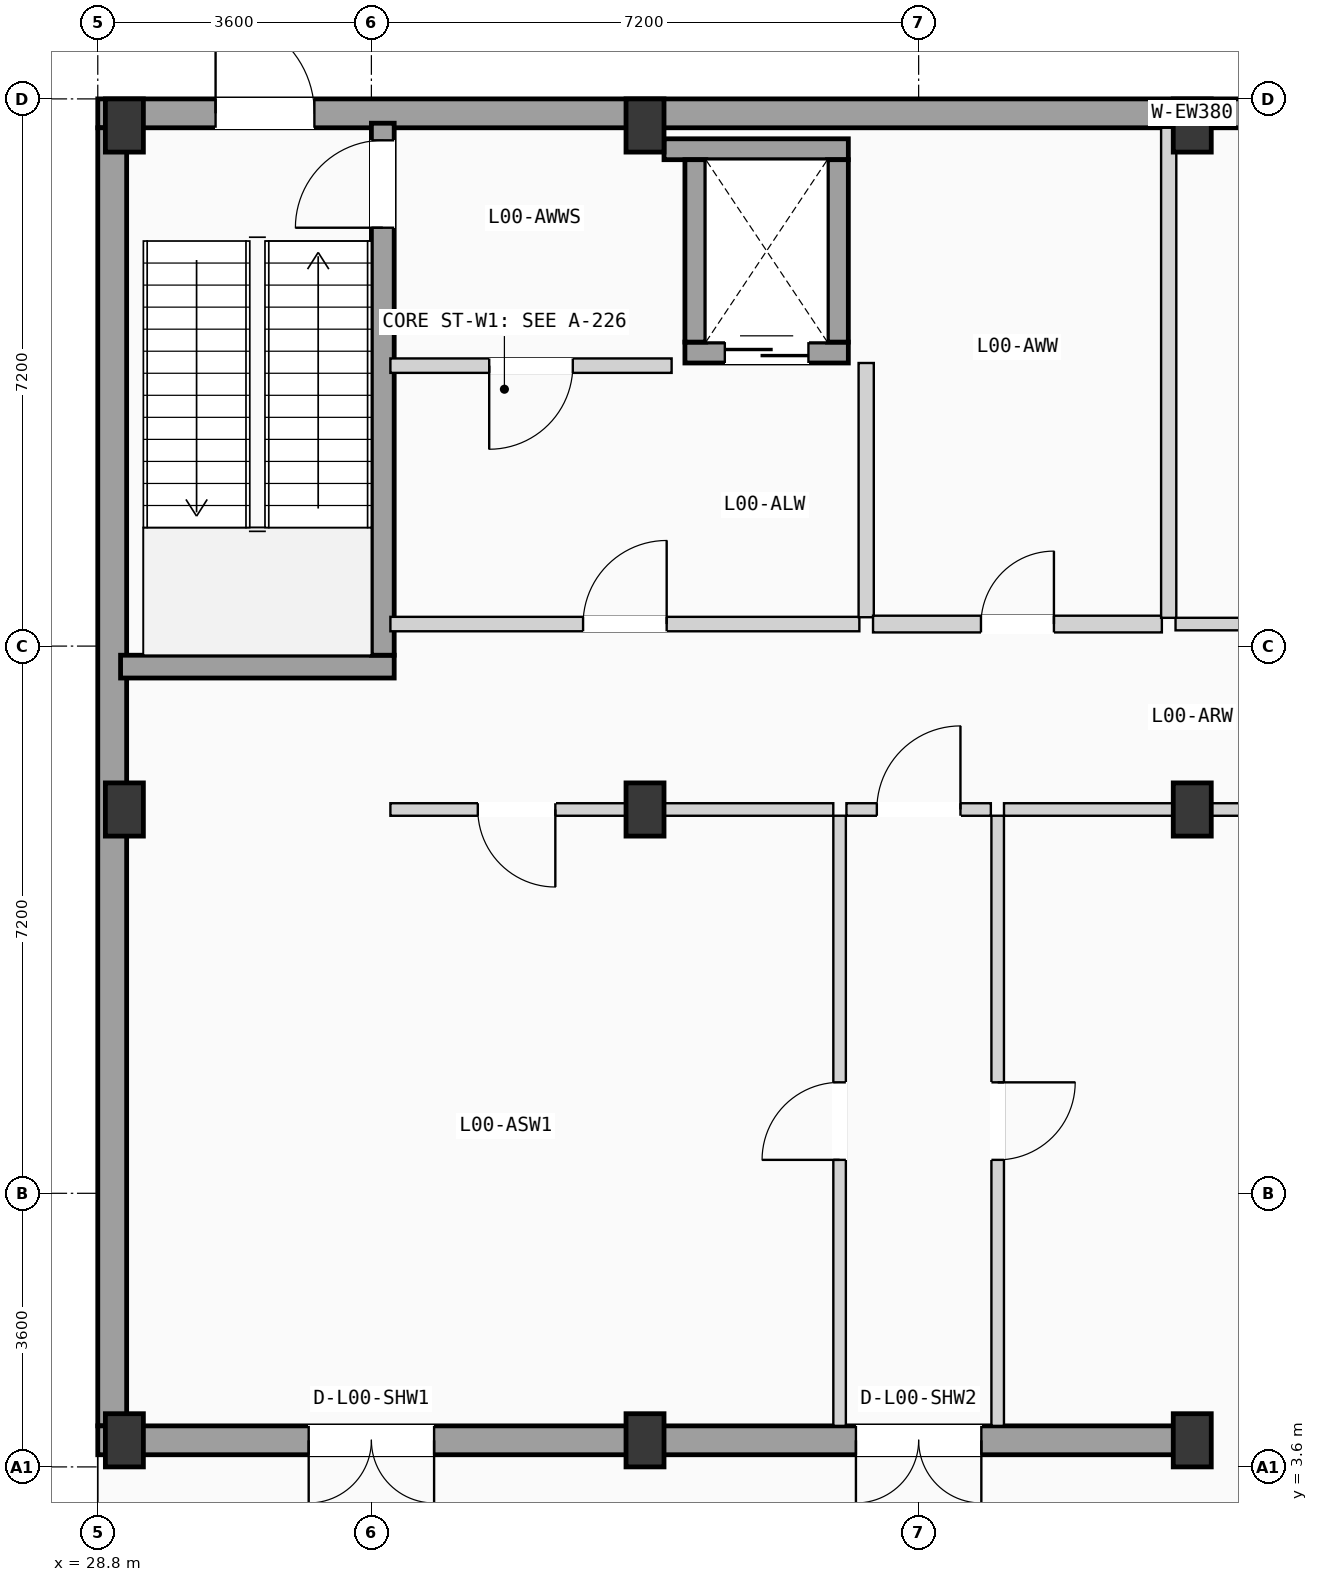
"""IFC4 building model, lengths in metres.
Left out: names, types, materials, properties, quantities, classifications, styles, units other than length and angle.
Written with IfcOpenShell. Run it as: python <this file> out.ifc"""

import sys

from ifc_helpers import new_model, si_unit, direction, frame, frame_2d, origin, origin_2d, place, context, subcontext, project, spatial, rectangle, extrude, element, fill, save


model = new_model("IFC4")
c1 = context("Model", 3, precision=1e-05, world=origin(), true_north=direction((0.0, 1.0)))
c2 = subcontext(c1, "Body", "Model", "MODEL_VIEW")
j1 = project(units=[si_unit("LENGTHUNIT", "METRE"), si_unit("PLANEANGLEUNIT", "RADIAN")], contexts=[c1])
p1 = place(None, origin())
s1 = spatial("IfcSite", under=j1, at=p1, CompositionType="ELEMENT")
p2 = place(p1, origin())
s2 = spatial("IfcBuilding", under=s1, at=p2, CompositionType="ELEMENT")
p3 = place(p2, origin())
s3 = spatial("IfcBuildingStorey", under=s2, at=p3, CompositionType="ELEMENT", Elevation=0.0)
for number, where, z_axis, x_axis in (
    (1, (29.15, 3.95, 0.0), (0.0, 0.0, 1.0), (1.0, 0.0, 0.0)),
    (2, (29.15, 12.25, 0.0), (0.0, 0.0, 1.0), (1.0, 0.0, 0.0)),
    (3, (29.15, 21.25, 0.0), (0.0, 0.0, 1.0), (1.0, 0.0, 0.0)),
    (4, (36.0, 3.95, 0.0), (0.0, 0.0, 1.0), (1.0, 0.0, 0.0)),
    (5, (36.0, 12.25, 0.0), (0.0, 0.0, 1.0), (1.0, 0.0, 0.0)),
    (6, (36.0, 21.25, 0.0), (0.0, 0.0, 1.0), (1.0, 0.0, 0.0)),
    (7, (43.2, 3.95, 0.0), (0.0, 0.0, 1.0), (1.0, 0.0, 0.0)),
    (8, (43.2, 12.25, 0.0), (0.0, 0.0, 1.0), (1.0, 0.0, 0.0)),
    (9, (43.2, 21.25, 0.0), (0.0, 0.0, 1.0), (1.0, 0.0, 0.0)),
):
    element("IfcColumn", number, at=place(p3, frame(where, z_axis=z_axis, x_axis=x_axis)), inside=s3, PredefinedType="COLUMN", context=c2, shape_type="SweptSolid", body=[
        extrude(rectangle(XDim=0.5, YDim=0.7, at=origin_2d()), origin(), (0.0, 0.0, 1.0), 4.9),
    ])
p4 = place(p3, frame((28.8, 21.41, 0.0), z_axis=(0.0, 0.0, 1.0), x_axis=(1.0, 0.0, 0.0)))
e10 = element("IfcWall", 10, at=p4, inside=s3, PredefinedType="SOLIDWALL", context=c2, shape_type="SweptSolid", body=[
    extrude(rectangle(XDim=28.8, YDim=0.38, at=frame_2d((14.4, 0.0))), origin(), (0.0, 0.0, 1.0), 4.625),
])
p5 = place(p4, frame((1.55, 0.0, 0.0)))
e11 = element("IfcOpeningElement", 11, at=p5, cuts=e10, PredefinedType="OPENING", context=c2, shape_type="SweptSolid", body=[
    extrude(rectangle(XDim=1.3, YDim=2.2, at=frame_2d((0.65, 1.1))), frame((0.0, 0.2, 0.0), z_axis=(0.0, -1.0, 0.0), x_axis=(1.0, 0.0, 0.0)), (0.0, 0.0, 1.0), 0.4),
])
p6 = place(p4, frame((25.95, 0.0, 0.0)))
e12 = element("IfcOpeningElement", 12, at=p6, cuts=e10, PredefinedType="OPENING", context=c2, shape_type="SweptSolid", body=[
    extrude(rectangle(XDim=1.3, YDim=2.2, at=frame_2d((0.65, 1.1))), frame((0.0, 0.2, 0.0), z_axis=(0.0, -1.0, 0.0), x_axis=(1.0, 0.0, 0.0)), (0.0, 0.0, 1.0), 0.4),
])
p7 = place(p3, frame((28.99, 4.14, 0.0), z_axis=(0.0, 0.0, 1.0), x_axis=(0.0, 1.0, 0.0)))
e13 = element("IfcWall", 13, at=p7, inside=s3, PredefinedType="SOLIDWALL", context=c2, shape_type="SweptSolid", body=[
    extrude(rectangle(XDim=17.08, YDim=0.38, at=frame_2d((8.54, 0.0))), origin(), (0.0, 0.0, 1.0), 4.625),
])
p8 = place(p3, frame((28.8, 3.95, 0.0), z_axis=(0.0, 0.0, 1.0), x_axis=(1.0, 0.0, 0.0)))
e14 = element("IfcWall", 14, at=p8, inside=s3, PredefinedType="SOLIDWALL", context=c2, shape_type="SweptSolid", body=[
    extrude(rectangle(XDim=7.2, YDim=0.38, at=frame_2d((3.6, 0.0))), origin(), (0.0, 0.0, 1.0), 4.625),
])
p9 = place(p8, frame((2.775, 0.0, 0.0)))
e15 = element("IfcOpeningElement", 15, at=p9, cuts=e14, PredefinedType="OPENING", context=c2, shape_type="SweptSolid", body=[
    extrude(rectangle(XDim=1.65, YDim=2.3, at=frame_2d((0.825, 1.15))), frame((0.0, 0.2, 0.0), z_axis=(0.0, -1.0, 0.0), x_axis=(1.0, 0.0, 0.0)), (0.0, 0.0, 1.0), 0.4),
])
p10 = place(p3, frame((36.0, 3.95, 0.0), z_axis=(0.0, 0.0, 1.0), x_axis=(1.0, 0.0, 0.0)))
e16 = element("IfcWall", 16, at=p10, inside=s3, PredefinedType="SOLIDWALL", context=c2, shape_type="SweptSolid", body=[
    extrude(rectangle(XDim=7.2, YDim=0.38, at=frame_2d((3.6, 0.0))), origin(), (0.0, 0.0, 1.0), 4.625),
])
p11 = place(p10, frame((2.775, 0.0, 0.0)))
e17 = element("IfcOpeningElement", 17, at=p11, cuts=e16, PredefinedType="OPENING", context=c2, shape_type="SweptSolid", body=[
    extrude(rectangle(XDim=1.65, YDim=2.3, at=frame_2d((0.825, 1.15))), frame((0.0, 0.2, 0.0), z_axis=(0.0, -1.0, 0.0), x_axis=(1.0, 0.0, 0.0)), (0.0, 0.0, 1.0), 0.4),
])
p12 = place(p3, frame((29.1, 14.13, 0.0), z_axis=(0.0, 0.0, 1.0), x_axis=(1.0, 0.0, 0.0)))
e18 = element("IfcWall", 18, at=p12, inside=s3, PredefinedType="SHEAR", context=c2, shape_type="SweptSolid", body=[
    extrude(rectangle(XDim=3.6, YDim=0.3, at=frame_2d((1.8, 0.0))), origin(), (0.0, 0.0, 1.0), 4.625),
])
p13 = place(p3, frame((32.55, 14.28, 0.0), z_axis=(0.0, 0.0, 1.0), x_axis=(0.0, 1.0, 0.0)))
e19 = element("IfcWall", 19, at=p13, inside=s3, PredefinedType="SHEAR", context=c2, shape_type="SweptSolid", body=[
    extrude(rectangle(XDim=7.0, YDim=0.3, at=frame_2d((3.5, 0.0))), origin(), (0.0, 0.0, 1.0), 4.625),
])
p14 = place(p13, frame((5.625, 0.0, 0.0)))
e20 = element("IfcOpeningElement", 20, at=p14, cuts=e19, PredefinedType="OPENING", context=c2, shape_type="SweptSolid", body=[
    extrude(rectangle(XDim=1.15, YDim=2.12, at=frame_2d((0.575, 1.06))), frame((0.0, 0.16, 0.0), z_axis=(0.0, -1.0, 0.0), x_axis=(1.0, 0.0, 0.0)), (0.0, 0.0, 1.0), 0.32),
])
p15 = place(p3, frame((36.525, 18.262, 0.0), z_axis=(0.0, 0.0, 1.0), x_axis=(1.0, 0.0, 0.0)))
e21 = element("IfcWall", 21, at=p15, inside=s3, PredefinedType="SHEAR", context=c2, shape_type="SweptSolid", body=[
    extrude(rectangle(XDim=2.15, YDim=0.275, at=frame_2d((1.075, 0.0))), origin(), (0.0, 0.0, 1.0), 4.625),
])
p16 = place(p15, frame((0.525, 0.0, 0.0)))
e22 = element("IfcOpeningElement", 22, at=p16, cuts=e21, PredefinedType="OPENING", context=c2, shape_type="SweptSolid", body=[
    extrude(rectangle(XDim=1.1, YDim=2.15, at=frame_2d((0.55, 1.075))), frame((0.0, 0.147, 0.0), z_axis=(0.0, -1.0, 0.0), x_axis=(1.0, 0.0, 0.0)), (0.0, 0.0, 1.0), 0.295),
])
p17 = place(p3, frame((36.25, 20.938, 0.0), z_axis=(0.0, 0.0, 1.0), x_axis=(1.0, 0.0, 0.0)))
e23 = element("IfcWall", 23, at=p17, inside=s3, PredefinedType="SHEAR", context=c2, shape_type="SweptSolid", body=[
    extrude(rectangle(XDim=2.425, YDim=0.275, at=frame_2d((1.212, 0.0))), origin(), (0.0, 0.0, 1.0), 4.625),
])
for number, where, z_axis, x_axis in (
    (24, (36.663, 18.4, 0.0), (0.0, 0.0, 1.0), (0.0, 1.0, 0.0)),
    (25, (38.538, 18.4, 0.0), (0.0, 0.0, 1.0), (0.0, 1.0, 0.0)),
):
    element("IfcWall", number, at=place(p3, frame(where, z_axis=z_axis, x_axis=x_axis)), inside=s3, PredefinedType="SHEAR", context=c2, shape_type="SweptSolid", body=[
        extrude(rectangle(XDim=2.4, YDim=0.275, at=frame_2d((1.2, 0.0))), origin(), (0.0, 0.0, 1.0), 4.625),
    ])
p18 = place(p3, frame((38.65, 12.25, 0.0), z_axis=(0.0, 0.0, 1.0), x_axis=(1.0, 0.0, 0.0)))
e26 = element("IfcWall", 26, at=p18, inside=s3, PredefinedType="PARTITIONING", context=c2, shape_type="SweptSolid", body=[
    extrude(rectangle(XDim=1.9, YDim=0.165, at=frame_2d((0.95, 0.0))), origin(), (0.0, 0.0, 1.0), 3.84),
])
p19 = place(p18, frame((0.4, 0.0, 0.0)))
e27 = element("IfcOpeningElement", 27, at=p19, cuts=e26, PredefinedType="OPENING", context=c2, shape_type="SweptSolid", body=[
    extrude(rectangle(XDim=1.1, YDim=2.12, at=frame_2d((0.55, 1.06))), frame((0.0, 0.093, 0.0), z_axis=(0.0, -1.0, 0.0), x_axis=(1.0, 0.0, 0.0)), (0.0, 0.0, 1.0), 0.185),
])
p20 = place(p3, frame((38.56, 4.14, 0.0), z_axis=(0.0, 0.0, 1.0), x_axis=(0.0, 1.0, 0.0)))
e28 = element("IfcWall", 28, at=p20, inside=s3, PredefinedType="PARTITIONING", context=c2, shape_type="SweptSolid", body=[
    extrude(rectangle(XDim=8.028, YDim=0.165, at=frame_2d((4.014, 0.0))), origin(), (0.0, 0.0, 1.0), 3.84),
])
p21 = place(p20, frame((3.5, 0.0, 0.0)))
e29 = element("IfcOpeningElement", 29, at=p21, cuts=e28, PredefinedType="OPENING", context=c2, shape_type="SweptSolid", body=[
    extrude(rectangle(XDim=1.02, YDim=2.16, at=frame_2d((0.51, 1.08))), frame((0.0, 0.093, 0.0), z_axis=(0.0, -1.0, 0.0), x_axis=(1.0, 0.0, 0.0)), (0.0, 0.0, 1.0), 0.185),
])
p22 = place(p3, frame((40.64, 4.14, 0.0), z_axis=(0.0, 0.0, 1.0), x_axis=(0.0, 1.0, 0.0)))
e30 = element("IfcWall", 30, at=p22, inside=s3, PredefinedType="PARTITIONING", context=c2, shape_type="SweptSolid", body=[
    extrude(rectangle(XDim=8.028, YDim=0.165, at=frame_2d((4.014, 0.0))), origin(), (0.0, 0.0, 1.0), 3.84),
])
p23 = place(p22, frame((3.5, 0.0, 0.0)))
e31 = element("IfcOpeningElement", 31, at=p23, cuts=e30, PredefinedType="OPENING", context=c2, shape_type="SweptSolid", body=[
    extrude(rectangle(XDim=1.02, YDim=2.16, at=frame_2d((0.51, 1.08))), frame((0.0, 0.093, 0.0), z_axis=(0.0, -1.0, 0.0), x_axis=(1.0, 0.0, 0.0)), (0.0, 0.0, 1.0), 0.185),
])
p24 = place(p3, frame((32.65, 18.09, 0.0), z_axis=(0.0, 0.0, 1.0), x_axis=(1.0, 0.0, 0.0)))
e32 = element("IfcWall", 32, at=p24, inside=s3, PredefinedType="PARTITIONING", context=c2, shape_type="SweptSolid", body=[
    extrude(rectangle(XDim=3.7, YDim=0.19, at=frame_2d((1.85, 0.0))), origin(), (0.0, 0.0, 1.0), 3.84),
])
p25 = place(p24, frame((1.3, 0.0, 0.0)))
e33 = element("IfcOpeningElement", 33, at=p25, cuts=e32, PredefinedType="OPENING", context=c2, shape_type="SweptSolid", body=[
    extrude(rectangle(XDim=1.1, YDim=2.12, at=frame_2d((0.55, 1.06))), frame((0.0, 0.105, 0.0), z_axis=(0.0, -1.0, 0.0), x_axis=(1.0, 0.0, 0.0)), (0.0, 0.0, 1.0), 0.21),
])
p26 = place(p3, frame((32.65, 14.69, 0.0), z_axis=(0.0, 0.0, 1.0), x_axis=(1.0, 0.0, 0.0)))
e34 = element("IfcWall", 34, at=p26, inside=s3, PredefinedType="PARTITIONING", context=c2, shape_type="SweptSolid", body=[
    extrude(rectangle(XDim=6.17, YDim=0.19, at=frame_2d((3.085, 0.0))), origin(), (0.0, 0.0, 1.0), 3.84),
])
p27 = place(p26, frame((2.535, 0.0, 0.0)))
e35 = element("IfcOpeningElement", 35, at=p27, cuts=e34, PredefinedType="OPENING", context=c2, shape_type="SweptSolid", body=[
    extrude(rectangle(XDim=1.1, YDim=2.12, at=frame_2d((0.55, 1.06))), frame((0.0, 0.105, 0.0), z_axis=(0.0, -1.0, 0.0), x_axis=(1.0, 0.0, 0.0)), (0.0, 0.0, 1.0), 0.21),
])
p28 = place(p3, frame((38.91, 14.78, 0.0), z_axis=(0.0, 0.0, 1.0), x_axis=(0.0, 1.0, 0.0)))
e36 = element("IfcWall", 36, at=p28, inside=s3, PredefinedType="PLUMBINGWALL", context=c2, shape_type="SweptSolid", body=[
    extrude(rectangle(XDim=3.345, YDim=0.2, at=frame_2d((1.672, 0.0))), origin(), (0.0, 0.0, 1.0), 3.84),
])
p29 = place(p3, frame((32.65, 12.25, 0.0), z_axis=(0.0, 0.0, 1.0), x_axis=(1.0, 0.0, 0.0)))
e37 = element("IfcWall", 37, at=p29, inside=s3, PredefinedType="PARTITIONING", context=c2, shape_type="SweptSolid", body=[
    extrude(rectangle(XDim=5.827, YDim=0.165, at=frame_2d((2.914, 0.0))), origin(), (0.0, 0.0, 1.0), 3.84),
])
p30 = place(p29, frame((1.15, 0.0, 0.0)))
e38 = element("IfcOpeningElement", 38, at=p30, cuts=e37, PredefinedType="OPENING", context=c2, shape_type="SweptSolid", body=[
    extrude(rectangle(XDim=1.02, YDim=2.16, at=frame_2d((0.51, 1.08))), frame((0.0, 0.093, 0.0), z_axis=(0.0, -1.0, 0.0), x_axis=(1.0, 0.0, 0.0)), (0.0, 0.0, 1.0), 0.185),
])
p31 = place(p3, frame((40.723, 12.25, 0.0), z_axis=(0.0, 0.0, 1.0), x_axis=(1.0, 0.0, 0.0)))
e39 = element("IfcWall", 39, at=p31, inside=s3, PredefinedType="PARTITIONING", context=c2, shape_type="SweptSolid", body=[
    extrude(rectangle(XDim=13.027, YDim=0.165, at=frame_2d((6.514, 0.0))), origin(), (0.0, 0.0, 1.0), 3.84),
])
p32 = place(p31, frame((6.007, 0.0, 0.0)))
e40 = element("IfcOpeningElement", 40, at=p32, cuts=e39, PredefinedType="OPENING", context=c2, shape_type="SweptSolid", body=[
    extrude(rectangle(XDim=1.02, YDim=2.16, at=frame_2d((0.51, 1.08))), frame((0.0, 0.093, 0.0), z_axis=(0.0, -1.0, 0.0), x_axis=(1.0, 0.0, 0.0)), (0.0, 0.0, 1.0), 0.185),
])
p33 = place(p3, frame((39.0, 14.69, 0.0), z_axis=(0.0, 0.0, 1.0), x_axis=(1.0, 0.0, 0.0)))
e41 = element("IfcWall", 41, at=p33, inside=s3, PredefinedType="PLUMBINGWALL", context=c2, shape_type="SweptSolid", body=[
    extrude(rectangle(XDim=3.8, YDim=0.22, at=frame_2d((1.9, 0.0))), origin(), (0.0, 0.0, 1.0), 3.84),
])
p34 = place(p33, frame((1.42, 0.0, 0.0)))
e42 = element("IfcOpeningElement", 42, at=p34, cuts=e41, PredefinedType="OPENING", context=c2, shape_type="SweptSolid", body=[
    extrude(rectangle(XDim=0.96, YDim=2.05, at=frame_2d((0.48, 1.025))), frame((0.0, 0.12, 0.0), z_axis=(0.0, -1.0, 0.0), x_axis=(1.0, 0.0, 0.0)), (0.0, 0.0, 1.0), 0.24),
])
p35 = place(p3, frame((42.98, 14.69, 0.0), z_axis=(0.0, 0.0, 1.0), x_axis=(1.0, 0.0, 0.0)))
e43 = element("IfcWall", 43, at=p35, inside=s3, PredefinedType="PARTITIONING", context=c2, shape_type="SweptSolid", body=[
    extrude(rectangle(XDim=8.54, YDim=0.165, at=frame_2d((4.27, 0.0))), origin(), (0.0, 0.0, 1.0), 3.84),
])
p36 = place(p35, frame((3.76, 0.0, 0.0)))
e44 = element("IfcOpeningElement", 44, at=p36, cuts=e43, PredefinedType="OPENING", context=c2, shape_type="SweptSolid", body=[
    extrude(rectangle(XDim=1.02, YDim=2.16, at=frame_2d((0.51, 1.08))), frame((0.0, 0.093, 0.0), z_axis=(0.0, -1.0, 0.0), x_axis=(1.0, 0.0, 0.0)), (0.0, 0.0, 1.0), 0.185),
])
p37 = place(p3, frame((42.89, 14.772, 0.0), z_axis=(0.0, 0.0, 1.0), x_axis=(0.0, 1.0, 0.0)))
e45 = element("IfcWall", 45, at=p37, inside=s3, PredefinedType="PLUMBINGWALL", context=c2, shape_type="SweptSolid", body=[
    extrude(rectangle(XDim=6.448, YDim=0.2, at=frame_2d((3.224, 0.0))), origin(), (0.0, 0.0, 1.0), 3.84),
])
p38 = place(p9, frame((1.65, 0.0, 0.0), z_axis=(0.0, 0.0, 1.0), x_axis=(-1.0, 0.0, 0.0)))
e46 = element("IfcDoor", 46, at=p38, inside=s3, OperationType="DOUBLE_DOOR_SINGLE_SWING", PredefinedType="DOOR", context=c2, shape_type="SweptSolid", body=[
    extrude(rectangle(XDim=1.65, YDim=2.3, at=frame_2d((0.825, 1.15))), frame((0.0, 0.025, 0.0), z_axis=(0.0, -1.0, 0.0), x_axis=(1.0, 0.0, 0.0)), (0.0, 0.0, 1.0), 0.05),
])
fill(e15, e46)
p39 = place(p11, frame((1.65, 0.0, 0.0), z_axis=(0.0, 0.0, 1.0), x_axis=(-1.0, 0.0, 0.0)))
e47 = element("IfcDoor", 47, at=p39, inside=s3, OperationType="DOUBLE_DOOR_SINGLE_SWING", PredefinedType="DOOR", context=c2, shape_type="SweptSolid", body=[
    extrude(rectangle(XDim=1.65, YDim=2.3, at=frame_2d((0.825, 1.15))), frame((0.0, 0.025, 0.0), z_axis=(0.0, -1.0, 0.0), x_axis=(1.0, 0.0, 0.0)), (0.0, 0.0, 1.0), 0.05),
])
fill(e17, e47)
p40 = place(p5, origin())
e48 = element("IfcDoor", 48, at=p40, inside=s3, OperationType="SINGLE_SWING_LEFT", PredefinedType="DOOR", context=c2, shape_type="SweptSolid", body=[
    extrude(rectangle(XDim=1.3, YDim=2.2, at=frame_2d((0.65, 1.1))), frame((0.0, 0.025, 0.0), z_axis=(0.0, -1.0, 0.0), x_axis=(1.0, 0.0, 0.0)), (0.0, 0.0, 1.0), 0.05),
])
fill(e11, e48)
p41 = place(p14, origin())
e49 = element("IfcDoor", 49, at=p41, inside=s3, OperationType="SINGLE_SWING_LEFT", PredefinedType="DOOR", context=c2, shape_type="SweptSolid", body=[
    extrude(rectangle(XDim=1.15, YDim=2.12, at=frame_2d((0.575, 1.06))), frame((0.0, 0.025, 0.0), z_axis=(0.0, -1.0, 0.0), x_axis=(1.0, 0.0, 0.0)), (0.0, 0.0, 1.0), 0.05),
])
fill(e20, e49)
p42 = place(p16, origin())
e50 = element("IfcDoor", 50, at=p42, inside=s3, OperationType="SLIDING_TO_LEFT", PredefinedType="DOOR", context=c2, shape_type="SweptSolid", body=[
    extrude(rectangle(XDim=1.1, YDim=2.15, at=frame_2d((0.55, 1.075))), frame((0.0, 0.025, 0.0), z_axis=(0.0, -1.0, 0.0), x_axis=(1.0, 0.0, 0.0)), (0.0, 0.0, 1.0), 0.05),
])
fill(e22, e50)
p43 = place(p19, origin())
e51 = element("IfcDoor", 51, at=p43, inside=s3, OperationType="SINGLE_SWING_RIGHT", PredefinedType="DOOR", context=c2, shape_type="SweptSolid", body=[
    extrude(rectangle(XDim=1.1, YDim=2.12, at=frame_2d((0.55, 1.06))), frame((0.0, 0.025, 0.0), z_axis=(0.0, -1.0, 0.0), x_axis=(1.0, 0.0, 0.0)), (0.0, 0.0, 1.0), 0.05),
])
fill(e27, e51)
p44 = place(p21, origin())
e52 = element("IfcDoor", 52, at=p44, inside=s3, OperationType="SINGLE_SWING_LEFT", PredefinedType="DOOR", context=c2, shape_type="SweptSolid", body=[
    extrude(rectangle(XDim=1.02, YDim=2.16, at=frame_2d((0.51, 1.08))), frame((0.0, 0.025, 0.0), z_axis=(0.0, -1.0, 0.0), x_axis=(1.0, 0.0, 0.0)), (0.0, 0.0, 1.0), 0.05),
])
fill(e29, e52)
p45 = place(p23, frame((1.02, 0.0, 0.0), z_axis=(0.0, 0.0, 1.0), x_axis=(-1.0, 0.0, 0.0)))
e53 = element("IfcDoor", 53, at=p45, inside=s3, OperationType="SINGLE_SWING_RIGHT", PredefinedType="DOOR", context=c2, shape_type="SweptSolid", body=[
    extrude(rectangle(XDim=1.02, YDim=2.16, at=frame_2d((0.51, 1.08))), frame((0.0, 0.025, 0.0), z_axis=(0.0, -1.0, 0.0), x_axis=(1.0, 0.0, 0.0)), (0.0, 0.0, 1.0), 0.05),
])
fill(e31, e53)
p46 = place(p25, frame((1.1, 0.0, 0.0), z_axis=(0.0, 0.0, 1.0), x_axis=(-1.0, 0.0, 0.0)))
e54 = element("IfcDoor", 54, at=p46, inside=s3, OperationType="SINGLE_SWING_LEFT", PredefinedType="DOOR", context=c2, shape_type="SweptSolid", body=[
    extrude(rectangle(XDim=1.1, YDim=2.12, at=frame_2d((0.55, 1.06))), frame((0.0, 0.025, 0.0), z_axis=(0.0, -1.0, 0.0), x_axis=(1.0, 0.0, 0.0)), (0.0, 0.0, 1.0), 0.05),
])
fill(e33, e54)
p47 = place(p27, origin())
e55 = element("IfcDoor", 55, at=p47, inside=s3, OperationType="SINGLE_SWING_RIGHT", PredefinedType="DOOR", context=c2, shape_type="SweptSolid", body=[
    extrude(rectangle(XDim=1.1, YDim=2.12, at=frame_2d((0.55, 1.06))), frame((0.0, 0.025, 0.0), z_axis=(0.0, -1.0, 0.0), x_axis=(1.0, 0.0, 0.0)), (0.0, 0.0, 1.0), 0.05),
])
fill(e35, e55)
p48 = place(p30, frame((1.02, 0.0, 0.0), z_axis=(0.0, 0.0, 1.0), x_axis=(-1.0, 0.0, 0.0)))
e56 = element("IfcDoor", 56, at=p48, inside=s3, OperationType="SINGLE_SWING_RIGHT", PredefinedType="DOOR", context=c2, shape_type="SweptSolid", body=[
    extrude(rectangle(XDim=1.02, YDim=2.16, at=frame_2d((0.51, 1.08))), frame((0.0, 0.025, 0.0), z_axis=(0.0, -1.0, 0.0), x_axis=(1.0, 0.0, 0.0)), (0.0, 0.0, 1.0), 0.05),
])
fill(e38, e56)
p49 = place(p34, origin())
e57 = element("IfcDoor", 57, at=p49, inside=s3, OperationType="SINGLE_SWING_RIGHT", PredefinedType="DOOR", context=c2, shape_type="SweptSolid", body=[
    extrude(rectangle(XDim=0.96, YDim=2.05, at=frame_2d((0.48, 1.025))), frame((0.0, 0.025, 0.0), z_axis=(0.0, -1.0, 0.0), x_axis=(1.0, 0.0, 0.0)), (0.0, 0.0, 1.0), 0.05),
])
fill(e42, e57)
save(model, sys.argv[1])
